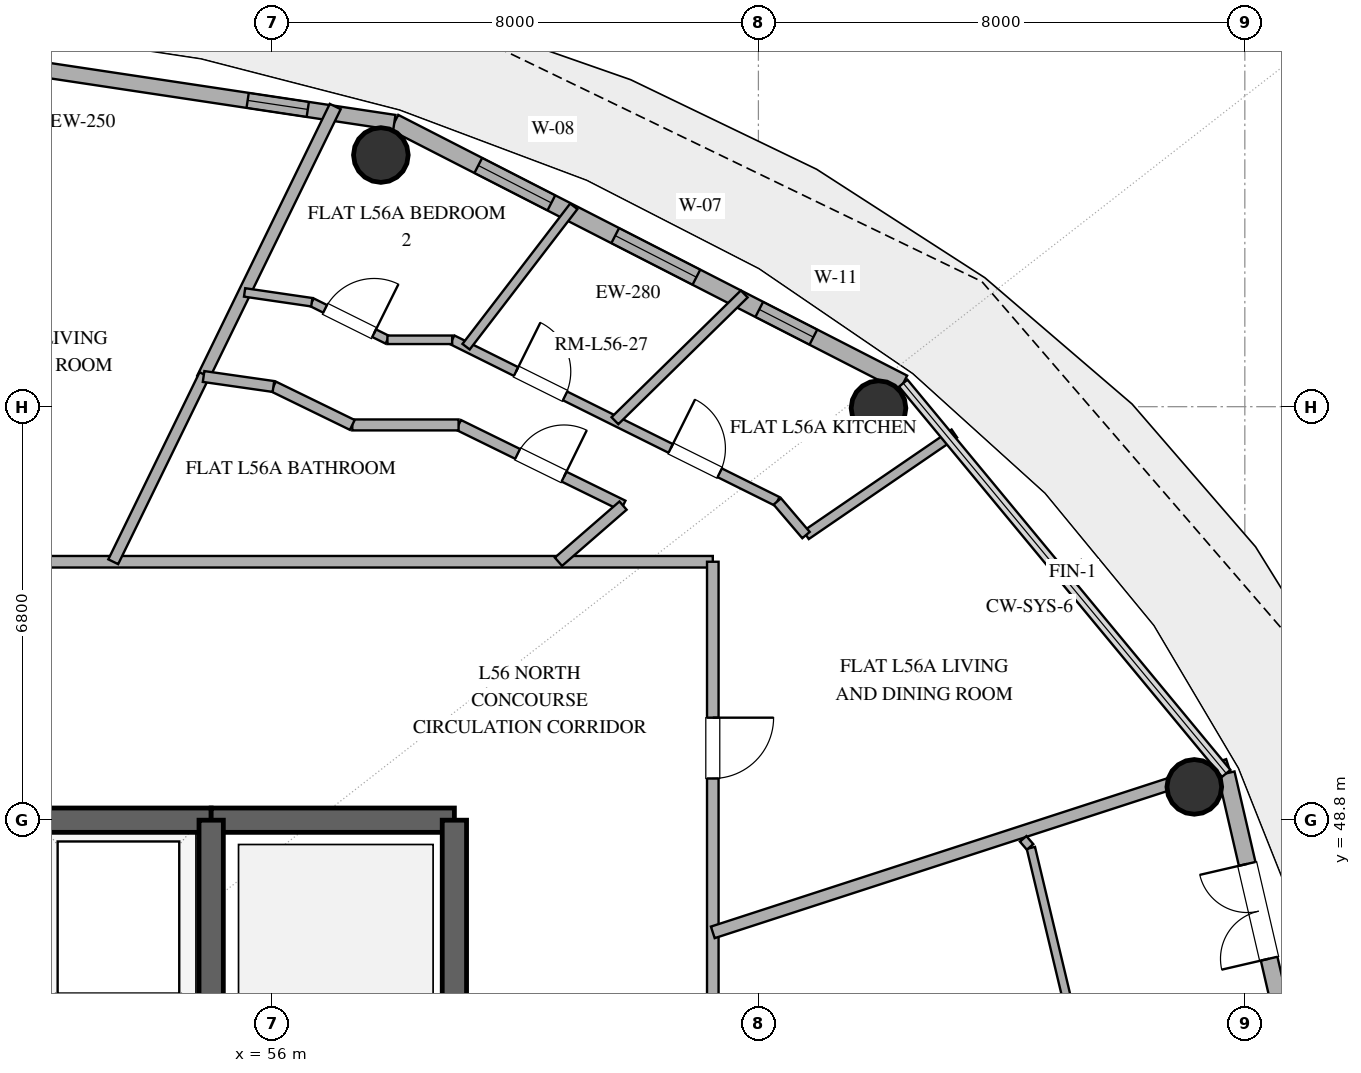
"""IFC4 building model, lengths in metres.
Left out: names, types, materials, properties, quantities, classifications, styles, units other than length and angle.
Written with IfcOpenShell. Run it as: python <this file> out.ifc"""

import sys

from ifc_helpers import new_model, si_unit, direction, frame, frame_2d, origin, origin_2d, place, context, subcontext, project, spatial, rectangle, hollow_circle, extrude, element, fill, save


model = new_model("IFC4")
c1 = context("Model", 3, precision=1e-05, world=origin(), true_north=direction((0.0, 1.0)))
c2 = subcontext(c1, "Body", "Model", "MODEL_VIEW")
j1 = project(units=[si_unit("LENGTHUNIT", "METRE"), si_unit("PLANEANGLEUNIT", "RADIAN")], contexts=[c1])
p1 = place(None, origin())
s1 = spatial("IfcSite", under=j1, at=p1, CompositionType="ELEMENT")
p2 = place(p1, origin())
s2 = spatial("IfcBuilding", under=s1, at=p2, CompositionType="ELEMENT")
p3 = place(p2, frame((0.0, 0.0, 220.8)))
s3 = spatial("IfcBuildingStorey", under=s2, at=p3, CompositionType="ELEMENT", Elevation=220.8)
p4 = place(p3, frame((41.0, 48.8, 0.0), z_axis=(0.0, 0.0, 1.0), x_axis=(1.0, 0.0, 0.0)))
e1 = element("IfcWall", 1, at=p4, inside=s3, PredefinedType="SHEAR", context=c2, shape_type="SweptSolid", body=[
    extrude(rectangle(XDim=14.0, YDim=0.4, at=frame_2d((7.0, 0.0))), origin(), (0.0, 0.0, 1.0), 3.36),
])
p5 = place(p4, frame((6.1, 0.0, 0.0)))
e2 = element("IfcOpeningElement", 2, at=p5, cuts=e1, PredefinedType="OPENING", context=c2, shape_type="SweptSolid", body=[
    extrude(rectangle(XDim=1.8, YDim=2.25, at=frame_2d((0.9, 1.125))), frame((0.0, 0.21, 0.0), z_axis=(0.0, -1.0, 0.0), x_axis=(1.0, 0.0, 0.0)), (0.0, 0.0, 1.0), 0.42),
])
p6 = place(p3, frame((55.0, 48.8, 0.0), z_axis=(0.0, 0.0, 1.0), x_axis=(1.0, 0.0, 0.0)))
e3 = element("IfcWall", 3, at=p6, inside=s3, PredefinedType="SHEAR", context=c2, shape_type="SweptSolid", body=[
    extrude(rectangle(XDim=4.0, YDim=0.4, at=frame_2d((2.0, 0.0))), origin(), (0.0, 0.0, 1.0), 3.36),
])
p7 = place(p3, frame((59.0, 35.2, 0.0), z_axis=(0.0, 0.0, 1.0), x_axis=(0.0, 1.0, 0.0)))
e4 = element("IfcWall", 4, at=p7, inside=s3, PredefinedType="SHEAR", context=c2, shape_type="SweptSolid", body=[
    extrude(rectangle(XDim=13.6, YDim=0.4, at=frame_2d((6.8, 0.0))), origin(), (0.0, 0.0, 1.0), 3.36),
])
p8 = place(p3, frame((55.0, 35.2, 0.0), z_axis=(0.0, 0.0, 1.0), x_axis=(0.0, 1.0, 0.0)))
e5 = element("IfcWall", 5, at=p8, inside=s3, PredefinedType="SHEAR", context=c2, shape_type="SweptSolid", body=[
    extrude(rectangle(XDim=13.6, YDim=0.4, at=frame_2d((6.8, 0.0))), origin(), (0.0, 0.0, 1.0), 3.36),
])
p9 = place(p8, frame((1.15, 0.0, 0.0)))
e6 = element("IfcOpeningElement", 6, at=p9, cuts=e5, PredefinedType="OPENING", context=c2, shape_type="SweptSolid", body=[
    extrude(rectangle(XDim=1.1, YDim=2.2, at=frame_2d((0.55, 1.1))), frame((0.0, 0.21, 0.0), z_axis=(0.0, -1.0, 0.0), x_axis=(1.0, 0.0, 0.0)), (0.0, 0.0, 1.0), 0.42),
])
for number, where, z_axis, x_axis in (
    (7, (71.169, 49.347, 0.0), (0.0, 0.0, 1.0), (1.0, 0.0, 0.0)),
    (8, (65.975, 55.576, 0.0), (0.0, 0.0, 1.0), (1.0, 0.0, 0.0)),
    (9, (57.791, 59.739, 0.0), (0.0, 0.0, 1.0), (1.0, 0.0, 0.0)),
):
    element("IfcColumn", number, at=place(p3, frame(where, z_axis=z_axis, x_axis=x_axis)), inside=s3, PredefinedType="COLUMN", context=c2, shape_type="SweptSolid", body=[
        extrude(hollow_circle(Radius=0.45, WallThickness=0.025, at=origin_2d()), origin(), (0.0, 0.0, 1.0), 3.36),
    ])
p10 = place(p3, frame((73.447, 42.0, 0.0), z_axis=(0.0, 0.0, 1.0), x_axis=(-0.225635078214, 0.974211892495, 0.0)))
e10 = element("IfcWall", 10, at=p10, inside=s3, PredefinedType="SOLIDWALL", context=c2, shape_type="SweptSolid", body=[
    extrude(rectangle(XDim=7.77, YDim=0.28, at=frame_2d((3.885, 0.0))), origin(), (0.0, 0.0, 1.0), 3.36),
])
p11 = place(p10, frame((4.642, 0.0, 0.0)))
e11 = element("IfcOpeningElement", 11, at=p11, cuts=e10, PredefinedType="OPENING", context=c2, shape_type="SweptSolid", body=[
    extrude(rectangle(XDim=1.6, YDim=2.25, at=frame_2d((0.8, 1.125))), frame((0.0, 0.15, 0.0), z_axis=(0.0, -1.0, 0.0), x_axis=(1.0, 0.0, 0.0)), (0.0, 0.0, 1.0), 0.3),
])
p12 = place(p3, frame((66.383, 55.987, 0.0), z_axis=(0.0, 0.0, 1.0), x_axis=(-0.890007394051, 0.455946091699, 0.0)))
e12 = element("IfcWall", 12, at=p12, inside=s3, PredefinedType="SOLIDWALL", context=c2, shape_type="SweptSolid", body=[
    extrude(rectangle(XDim=9.404, YDim=0.28, at=frame_2d((4.702, 0.0))), origin(), (0.0, 0.0, 1.0), 3.36),
])
p13 = place(p12, frame((1.661, 0.0, 0.85)))
e13 = element("IfcOpeningElement", 13, at=p13, cuts=e12, PredefinedType="OPENING", context=c2, shape_type="SweptSolid", body=[
    extrude(rectangle(XDim=1.0, YDim=1.8, at=frame_2d((0.5, 0.9))), frame((0.0, 0.15, 0.0), z_axis=(0.0, -1.0, 0.0), x_axis=(1.0, 0.0, 0.0)), (0.0, 0.0, 1.0), 0.3),
])
p14 = place(p12, frame((3.823, 0.0, 0.85)))
e14 = element("IfcOpeningElement", 14, at=p14, cuts=e12, PredefinedType="OPENING", context=c2, shape_type="SweptSolid", body=[
    extrude(rectangle(XDim=1.5, YDim=1.8, at=frame_2d((0.75, 0.9))), frame((0.0, 0.15, 0.0), z_axis=(0.0, -1.0, 0.0), x_axis=(1.0, 0.0, 0.0)), (0.0, 0.0, 1.0), 0.3),
])
p15 = place(p12, frame((6.503, 0.0, 0.85)))
e15 = element("IfcOpeningElement", 15, at=p15, cuts=e12, PredefinedType="OPENING", context=c2, shape_type="SweptSolid", body=[
    extrude(rectangle(XDim=1.35, YDim=1.8, at=frame_2d((0.675, 0.9))), frame((0.0, 0.15, 0.0), z_axis=(0.0, -1.0, 0.0), x_axis=(1.0, 0.0, 0.0)), (0.0, 0.0, 1.0), 0.3),
])
p16 = place(p3, frame((58.013, 60.274, 0.0), z_axis=(0.0, 0.0, 1.0), x_axis=(-0.988882522213, 0.148698881169, 0.0)))
e16 = element("IfcWall", 16, at=p16, inside=s3, PredefinedType="SOLIDWALL", context=c2, shape_type="SweptSolid", body=[
    extrude(rectangle(XDim=10.125, YDim=0.25, at=frame_2d((5.062, 0.0))), origin(), (0.0, 0.0, 1.0), 3.36),
])
p17 = place(p16, frame((1.44, 0.0, 1.42)))
e17 = element("IfcOpeningElement", 17, at=p17, cuts=e16, PredefinedType="OPENING", context=c2, shape_type="SweptSolid", body=[
    extrude(rectangle(XDim=1.0, YDim=1.05, at=frame_2d((0.5, 0.525))), frame((0.0, 0.135, 0.0), z_axis=(0.0, -1.0, 0.0), x_axis=(1.0, 0.0, 0.0)), (0.0, 0.0, 1.0), 0.27),
])
p18 = place(p3, frame((48.74, 53.05, 0.0), z_axis=(0.0, 0.0, 1.0), x_axis=(1.0, 0.0, 0.0)))
e18 = element("IfcWall", 18, at=p18, inside=s3, PredefinedType="PARTITIONING", context=c2, shape_type="SweptSolid", body=[
    extrude(rectangle(XDim=14.51, YDim=0.19, at=frame_2d((7.255, 0.0))), origin(), (0.0, 0.0, 1.0), 2.72),
])
p19 = place(p18, frame((1.842, 0.0, 0.0)))
e19 = element("IfcOpeningElement", 19, at=p19, cuts=e18, PredefinedType="OPENING", context=c2, shape_type="SweptSolid", body=[
    extrude(rectangle(XDim=1.0, YDim=2.2, at=frame_2d((0.5, 1.1))), frame((0.0, 0.105, 0.0), z_axis=(0.0, -1.0, 0.0), x_axis=(1.0, 0.0, 0.0)), (0.0, 0.0, 1.0), 0.21),
])
p20 = place(p3, frame((63.25, 53.05, 0.0), z_axis=(0.0, 0.0, 1.0), x_axis=(0.0, -1.0, 0.0)))
e20 = element("IfcWall", 20, at=p20, inside=s3, PredefinedType="PARTITIONING", context=c2, shape_type="SweptSolid", body=[
    extrude(rectangle(XDim=16.039, YDim=0.19, at=frame_2d((8.019, 0.0))), origin(), (0.0, 0.0, 1.0), 2.72),
])
p21 = place(p20, frame((9.263, 0.0, 0.0)))
e21 = element("IfcOpeningElement", 21, at=p21, cuts=e20, PredefinedType="OPENING", context=c2, shape_type="SweptSolid", body=[
    extrude(rectangle(XDim=1.0, YDim=2.2, at=frame_2d((0.5, 1.1))), frame((0.0, 0.105, 0.0), z_axis=(0.0, -1.0, 0.0), x_axis=(1.0, 0.0, 0.0)), (0.0, 0.0, 1.0), 0.21),
])
p22 = place(p20, frame((2.564, 0.0, 0.0)))
e22 = element("IfcOpeningElement", 22, at=p22, cuts=e20, PredefinedType="OPENING", context=c2, shape_type="SweptSolid", body=[
    extrude(rectangle(XDim=1.0, YDim=2.2, at=frame_2d((0.5, 1.1))), frame((0.0, 0.105, 0.0), z_axis=(0.0, -1.0, 0.0), x_axis=(1.0, 0.0, 0.0)), (0.0, 0.0, 1.0), 0.21),
])
p23 = place(p3, frame((69.996, 42.0, 0.0), z_axis=(0.0, 0.0, 1.0), x_axis=(-0.232298462197, 0.972644551962, 0.0)))
e23 = element("IfcWall", 23, at=p23, inside=s3, PredefinedType="PARTITIONING", context=c2, shape_type="SweptSolid", body=[
    extrude(rectangle(XDim=6.523, YDim=0.14, at=frame_2d((3.262, 0.0))), origin(), (0.0, 0.0, 1.0), 2.72),
])
p24 = place(p23, frame((2.812, 0.0, 0.0)))
e24 = element("IfcOpeningElement", 24, at=p24, cuts=e23, PredefinedType="OPENING", context=c2, shape_type="SweptSolid", body=[
    extrude(rectangle(XDim=0.9, YDim=2.1, at=frame_2d((0.45, 1.05))), frame((0.0, 0.08, 0.0), z_axis=(0.0, -1.0, 0.0), x_axis=(1.0, 0.0, 0.0)), (0.0, 0.0, 1.0), 0.16),
])
p25 = place(p3, frame((63.25, 46.955, 0.0), z_axis=(0.0, 0.0, 1.0), x_axis=(0.951059035429, 0.30900924117, 0.0)))
e25 = element("IfcWall", 25, at=p25, inside=s3, PredefinedType="PARTITIONING", context=c2, shape_type="SweptSolid", body=[
    extrude(rectangle(XDim=8.91, YDim=0.2, at=frame_2d((4.455, 0.0))), origin(), (0.0, 0.0, 1.0), 2.72),
])
p26 = place(p3, frame((57.041, 60.536, 0.0), z_axis=(0.0, 0.0, 1.0), x_axis=(-0.438355931311, -0.898801467224, 0.0)))
e26 = element("IfcWall", 26, at=p26, inside=s3, PredefinedType="PARTITIONING", context=c2, shape_type="SweptSolid", body=[
    extrude(rectangle(XDim=4.974, YDim=0.2, at=frame_2d((2.487, 0.0))), origin(), (0.0, 0.0, 1.0), 2.72),
])
p27 = place(p3, frame((54.89, 56.127, 0.0), z_axis=(0.0, 0.0, 1.0), x_axis=(-0.438347749683, -0.898805457453, 0.0)))
e27 = element("IfcWall", 27, at=p27, inside=s3, PredefinedType="PLUMBINGWALL", context=c2, shape_type="SweptSolid", body=[
    extrude(rectangle(XDim=3.423, YDim=0.18, at=frame_2d((1.711, 0.0))), origin(), (0.0, 0.0, 1.0), 2.72),
])
p28 = place(p3, frame((58.964, 56.7, 0.0), z_axis=(0.0, 0.0, 1.0), x_axis=(0.895447007867, -0.445168121166, 0.0)))
e28 = element("IfcWall", 28, at=p28, inside=s3, PredefinedType="PLUMBINGWALL", context=c2, shape_type="SweptSolid", body=[
    extrude(rectangle(XDim=5.971, YDim=0.16, at=frame_2d((2.986, 0.0))), origin(), (0.0, 0.0, 1.0), 2.72),
])
p29 = place(p28, frame((4.013, 0.0, 0.0)))
e29 = element("IfcOpeningElement", 29, at=p29, cuts=e28, PredefinedType="OPENING", context=c2, shape_type="SweptSolid", body=[
    extrude(rectangle(XDim=0.9, YDim=2.1, at=frame_2d((0.45, 1.05))), frame((0.0, 0.09, 0.0), z_axis=(0.0, -1.0, 0.0), x_axis=(1.0, 0.0, 0.0)), (0.0, 0.0, 1.0), 0.18),
])
p30 = place(p28, frame((1.173, 0.0, 0.0)))
e30 = element("IfcOpeningElement", 30, at=p30, cuts=e28, PredefinedType="OPENING", context=c2, shape_type="SweptSolid", body=[
    extrude(rectangle(XDim=0.9, YDim=2.1, at=frame_2d((0.45, 1.05))), frame((0.0, 0.09, 0.0), z_axis=(0.0, -1.0, 0.0), x_axis=(1.0, 0.0, 0.0)), (0.0, 0.0, 1.0), 0.18),
])
p31 = place(p3, frame((59.069, 55.3, 0.0), z_axis=(0.0, 0.0, 1.0), x_axis=(0.897805130008, -0.440392947867, 0.0)))
e31 = element("IfcWall", 31, at=p31, inside=s3, PredefinedType="PLUMBINGWALL", context=c2, shape_type="SweptSolid", body=[
    extrude(rectangle(XDim=3.012, YDim=0.18, at=frame_2d((1.506, 0.0))), origin(), (0.0, 0.0, 1.0), 2.72),
])
p32 = place(p31, frame((1.081, 0.0, 0.0)))
e32 = element("IfcOpeningElement", 32, at=p32, cuts=e31, PredefinedType="OPENING", context=c2, shape_type="SweptSolid", body=[
    extrude(rectangle(XDim=0.85, YDim=2.1, at=frame_2d((0.425, 1.05))), frame((0.0, 0.1, 0.0), z_axis=(0.0, -1.0, 0.0), x_axis=(1.0, 0.0, 0.0)), (0.0, 0.0, 1.0), 0.2),
])
p33 = place(p3, frame((63.767, 57.454, 0.0), z_axis=(0.0, 0.0, 1.0), x_axis=(-0.714203003572, -0.699938618515, 0.0)))
e33 = element("IfcWall", 33, at=p33, inside=s3, PredefinedType="PLUMBINGWALL", context=c2, shape_type="SweptSolid", body=[
    extrude(rectangle(XDim=2.978, YDim=0.16, at=frame_2d((1.489, 0.0))), origin(), (0.0, 0.0, 1.0), 2.72),
])
p34 = place(p3, frame((64.783, 53.489, 0.0), z_axis=(0.0, 0.0, 1.0), x_axis=(0.825165456639, 0.564891112666, 0.0)))
e34 = element("IfcWall", 34, at=p34, inside=s3, PredefinedType="PLUMBINGWALL", context=c2, shape_type="SweptSolid", body=[
    extrude(rectangle(XDim=2.957, YDim=0.16, at=frame_2d((1.478, 0.0))), origin(), (0.0, 0.0, 1.0), 2.72),
])
p35 = place(p3, frame((60.964, 58.895, 0.0), z_axis=(0.0, 0.0, 1.0), x_axis=(-0.608822468724, -0.793306499139, 0.0)))
e35 = element("IfcWall", 35, at=p35, inside=s3, PredefinedType="PARTITIONING", context=c2, shape_type="SweptSolid", body=[
    extrude(rectangle(XDim=2.91, YDim=0.15, at=frame_2d((1.455, 0.0))), origin(), (0.0, 0.0, 1.0), 2.72),
])
p36 = place(p3, frame((57.321, 55.3, 0.0), z_axis=(0.0, 0.0, 1.0), x_axis=(1.0, 0.0, 0.0)))
e36 = element("IfcWall", 36, at=p36, inside=s3, PredefinedType="PLUMBINGWALL", context=c2, shape_type="SweptSolid", body=[
    extrude(rectangle(XDim=1.748, YDim=0.18, at=frame_2d((0.874, 0.0))), origin(), (0.0, 0.0, 1.0), 2.72),
])
p37 = place(p3, frame((56.024, 55.932, 0.0), z_axis=(0.0, 0.0, 1.0), x_axis=(0.898916394035, -0.438120207861, 0.0)))
e37 = element("IfcWall", 37, at=p37, inside=s3, PredefinedType="PLUMBINGWALL", context=c2, shape_type="SweptSolid", body=[
    extrude(rectangle(XDim=1.443, YDim=0.18, at=frame_2d((0.721, 0.0))), origin(), (0.0, 0.0, 1.0), 2.72),
])
p38 = place(p3, frame((61.774, 53.973, 0.0), z_axis=(0.0, 0.0, 1.0), x_axis=(-0.7546578079, -0.656118581489, 0.0)))
e38 = element("IfcWall", 38, at=p38, inside=s3, PredefinedType="PLUMBINGWALL", context=c2, shape_type="SweptSolid", body=[
    extrude(rectangle(XDim=1.407, YDim=0.18, at=frame_2d((0.704, 0.0))), origin(), (0.0, 0.0, 1.0), 2.72),
])
p39 = place(p3, frame((56.655, 57.318, 0.0), z_axis=(0.0, 0.0, 1.0), x_axis=(0.895584310315, -0.444891833053, 0.0)))
e39 = element("IfcWall", 39, at=p39, inside=s3, PredefinedType="PARTITIONING", context=c2, shape_type="SweptSolid", body=[
    extrude(rectangle(XDim=1.389, YDim=0.14, at=frame_2d((0.694, 0.0))), origin(), (0.0, 0.0, 1.0), 2.72),
])
p40 = place(p39, frame((0.244, 0.0, 0.0)))
e40 = element("IfcOpeningElement", 40, at=p40, cuts=e39, PredefinedType="OPENING", context=c2, shape_type="SweptSolid", body=[
    extrude(rectangle(XDim=0.9, YDim=2.1, at=frame_2d((0.45, 1.05))), frame((0.0, 0.08, 0.0), z_axis=(0.0, -1.0, 0.0), x_axis=(1.0, 0.0, 0.0)), (0.0, 0.0, 1.0), 0.16),
])
p41 = place(p3, frame((54.875, 56.096, 0.0), z_axis=(0.0, 0.0, 1.0), x_axis=(0.989924230083, -0.141598088596, 0.0)))
e41 = element("IfcWall", 41, at=p41, inside=s3, PredefinedType="PLUMBINGWALL", context=c2, shape_type="SweptSolid", body=[
    extrude(rectangle(XDim=1.16, YDim=0.18, at=frame_2d((0.58, 0.0))), origin(), (0.0, 0.0, 1.0), 2.72),
])
p42 = place(p3, frame((55.55, 57.479, 0.0), z_axis=(0.0, 0.0, 1.0), x_axis=(0.989534281859, -0.144297973051, 0.0)))
e42 = element("IfcWall", 42, at=p42, inside=s3, PredefinedType="PARTITIONING", context=c2, shape_type="SweptSolid", body=[
    extrude(rectangle(XDim=1.117, YDim=0.14, at=frame_2d((0.558, 0.0))), origin(), (0.0, 0.0, 1.0), 2.72),
])
p43 = place(p3, frame((57.899, 56.7, 0.0), z_axis=(0.0, 0.0, 1.0), x_axis=(1.0, 0.0, 0.0)))
e43 = element("IfcWall", 43, at=p43, inside=s3, PredefinedType="PARTITIONING", context=c2, shape_type="SweptSolid", body=[
    extrude(rectangle(XDim=1.065, YDim=0.14, at=frame_2d((0.533, 0.0))), origin(), (0.0, 0.0, 1.0), 2.72),
])
p44 = place(p3, frame((64.311, 54.042, 0.0), z_axis=(0.0, 0.0, 1.0), x_axis=(0.648992334632, -0.760794945823, 0.0)))
e44 = element("IfcWall", 44, at=p44, inside=s3, PredefinedType="PLUMBINGWALL", context=c2, shape_type="SweptSolid", body=[
    extrude(rectangle(XDim=0.727, YDim=0.16, at=frame_2d((0.364, 0.0))), origin(), (0.0, 0.0, 1.0), 2.72),
])
p45 = place(p3, frame((68.468, 48.36, 0.0), z_axis=(0.0, 0.0, 1.0), x_axis=(-0.649065422773, 0.760732592282, 0.0)))
e45 = element("IfcWall", 45, at=p45, inside=s3, PredefinedType="PARTITIONING", context=c2, shape_type="SweptSolid", body=[
    extrude(rectangle(XDim=0.175, YDim=0.14, at=frame_2d((0.087, 0.0))), origin(), (0.0, 0.0, 1.0), 2.72),
])
p46 = place(p11, origin())
e46 = element("IfcDoor", 46, at=p46, inside=s3, OperationType="DOUBLE_DOOR_SINGLE_SWING", PredefinedType="DOOR", context=c2, shape_type="SweptSolid", body=[
    extrude(rectangle(XDim=1.6, YDim=2.25, at=frame_2d((0.8, 1.125))), frame((0.0, 0.025, 0.0), z_axis=(0.0, -1.0, 0.0), x_axis=(1.0, 0.0, 0.0)), (0.0, 0.0, 1.0), 0.05),
])
fill(e11, e46)
p47 = place(p13, origin())
e47 = element("IfcWindow", 47, at=p47, inside=s3, PartitioningType="SINGLE_PANEL", PredefinedType="WINDOW", context=c2, shape_type="SweptSolid", body=[
    extrude(rectangle(XDim=1.0, YDim=1.8, at=frame_2d((0.5, 0.9))), frame((0.0, 0.03, 0.0), z_axis=(0.0, -1.0, 0.0), x_axis=(1.0, 0.0, 0.0)), (0.0, 0.0, 1.0), 0.06),
])
fill(e13, e47)
p48 = place(p14, origin())
e48 = element("IfcWindow", 48, at=p48, inside=s3, PartitioningType="SINGLE_PANEL", PredefinedType="WINDOW", context=c2, shape_type="SweptSolid", body=[
    extrude(rectangle(XDim=1.5, YDim=1.8, at=frame_2d((0.75, 0.9))), frame((0.0, 0.03, 0.0), z_axis=(0.0, -1.0, 0.0), x_axis=(1.0, 0.0, 0.0)), (0.0, 0.0, 1.0), 0.06),
])
fill(e14, e48)
p49 = place(p15, origin())
e49 = element("IfcWindow", 49, at=p49, inside=s3, PartitioningType="SINGLE_PANEL", PredefinedType="WINDOW", context=c2, shape_type="SweptSolid", body=[
    extrude(rectangle(XDim=1.35, YDim=1.8, at=frame_2d((0.675, 0.9))), frame((0.0, 0.03, 0.0), z_axis=(0.0, -1.0, 0.0), x_axis=(1.0, 0.0, 0.0)), (0.0, 0.0, 1.0), 0.06),
])
fill(e15, e49)
p50 = place(p17, origin())
e50 = element("IfcWindow", 50, at=p50, inside=s3, PartitioningType="SINGLE_PANEL", PredefinedType="WINDOW", context=c2, shape_type="SweptSolid", body=[
    extrude(rectangle(XDim=1.0, YDim=1.05, at=frame_2d((0.5, 0.525))), frame((0.0, 0.03, 0.0), z_axis=(0.0, -1.0, 0.0), x_axis=(1.0, 0.0, 0.0)), (0.0, 0.0, 1.0), 0.06),
])
fill(e17, e50)
p51 = place(p22, origin())
e51 = element("IfcDoor", 51, at=p51, inside=s3, OperationType="SINGLE_SWING_LEFT", PredefinedType="DOOR", context=c2, shape_type="SweptSolid", body=[
    extrude(rectangle(XDim=1.0, YDim=2.2, at=frame_2d((0.5, 1.1))), frame((0.0, 0.025, 0.0), z_axis=(0.0, -1.0, 0.0), x_axis=(1.0, 0.0, 0.0)), (0.0, 0.0, 1.0), 0.05),
])
fill(e22, e51)
p52 = place(p29, origin())
e52 = element("IfcDoor", 52, at=p52, inside=s3, OperationType="SINGLE_SWING_LEFT", PredefinedType="DOOR", context=c2, shape_type="SweptSolid", body=[
    extrude(rectangle(XDim=0.9, YDim=2.1, at=frame_2d((0.45, 1.05))), frame((0.0, 0.025, 0.0), z_axis=(0.0, -1.0, 0.0), x_axis=(1.0, 0.0, 0.0)), (0.0, 0.0, 1.0), 0.05),
])
fill(e29, e52)
p53 = place(p30, origin())
e53 = element("IfcDoor", 53, at=p53, inside=s3, OperationType="SINGLE_SWING_LEFT", PredefinedType="DOOR", context=c2, shape_type="SweptSolid", body=[
    extrude(rectangle(XDim=0.9, YDim=2.1, at=frame_2d((0.45, 1.05))), frame((0.0, 0.025, 0.0), z_axis=(0.0, -1.0, 0.0), x_axis=(1.0, 0.0, 0.0)), (0.0, 0.0, 1.0), 0.05),
])
fill(e30, e53)
p54 = place(p32, origin())
e54 = element("IfcDoor", 54, at=p54, inside=s3, OperationType="SINGLE_SWING_RIGHT", PredefinedType="DOOR", context=c2, shape_type="SweptSolid", body=[
    extrude(rectangle(XDim=0.85, YDim=2.1, at=frame_2d((0.425, 1.05))), frame((0.0, 0.025, 0.0), z_axis=(0.0, -1.0, 0.0), x_axis=(1.0, 0.0, 0.0)), (0.0, 0.0, 1.0), 0.05),
])
fill(e32, e54)
p55 = place(p40, origin())
e55 = element("IfcDoor", 55, at=p55, inside=s3, OperationType="SINGLE_SWING_RIGHT", PredefinedType="DOOR", context=c2, shape_type="SweptSolid", body=[
    extrude(rectangle(XDim=0.9, YDim=2.1, at=frame_2d((0.45, 1.05))), frame((0.0, 0.025, 0.0), z_axis=(0.0, -1.0, 0.0), x_axis=(1.0, 0.0, 0.0)), (0.0, 0.0, 1.0), 0.05),
])
fill(e40, e55)
save(model, sys.argv[1])
